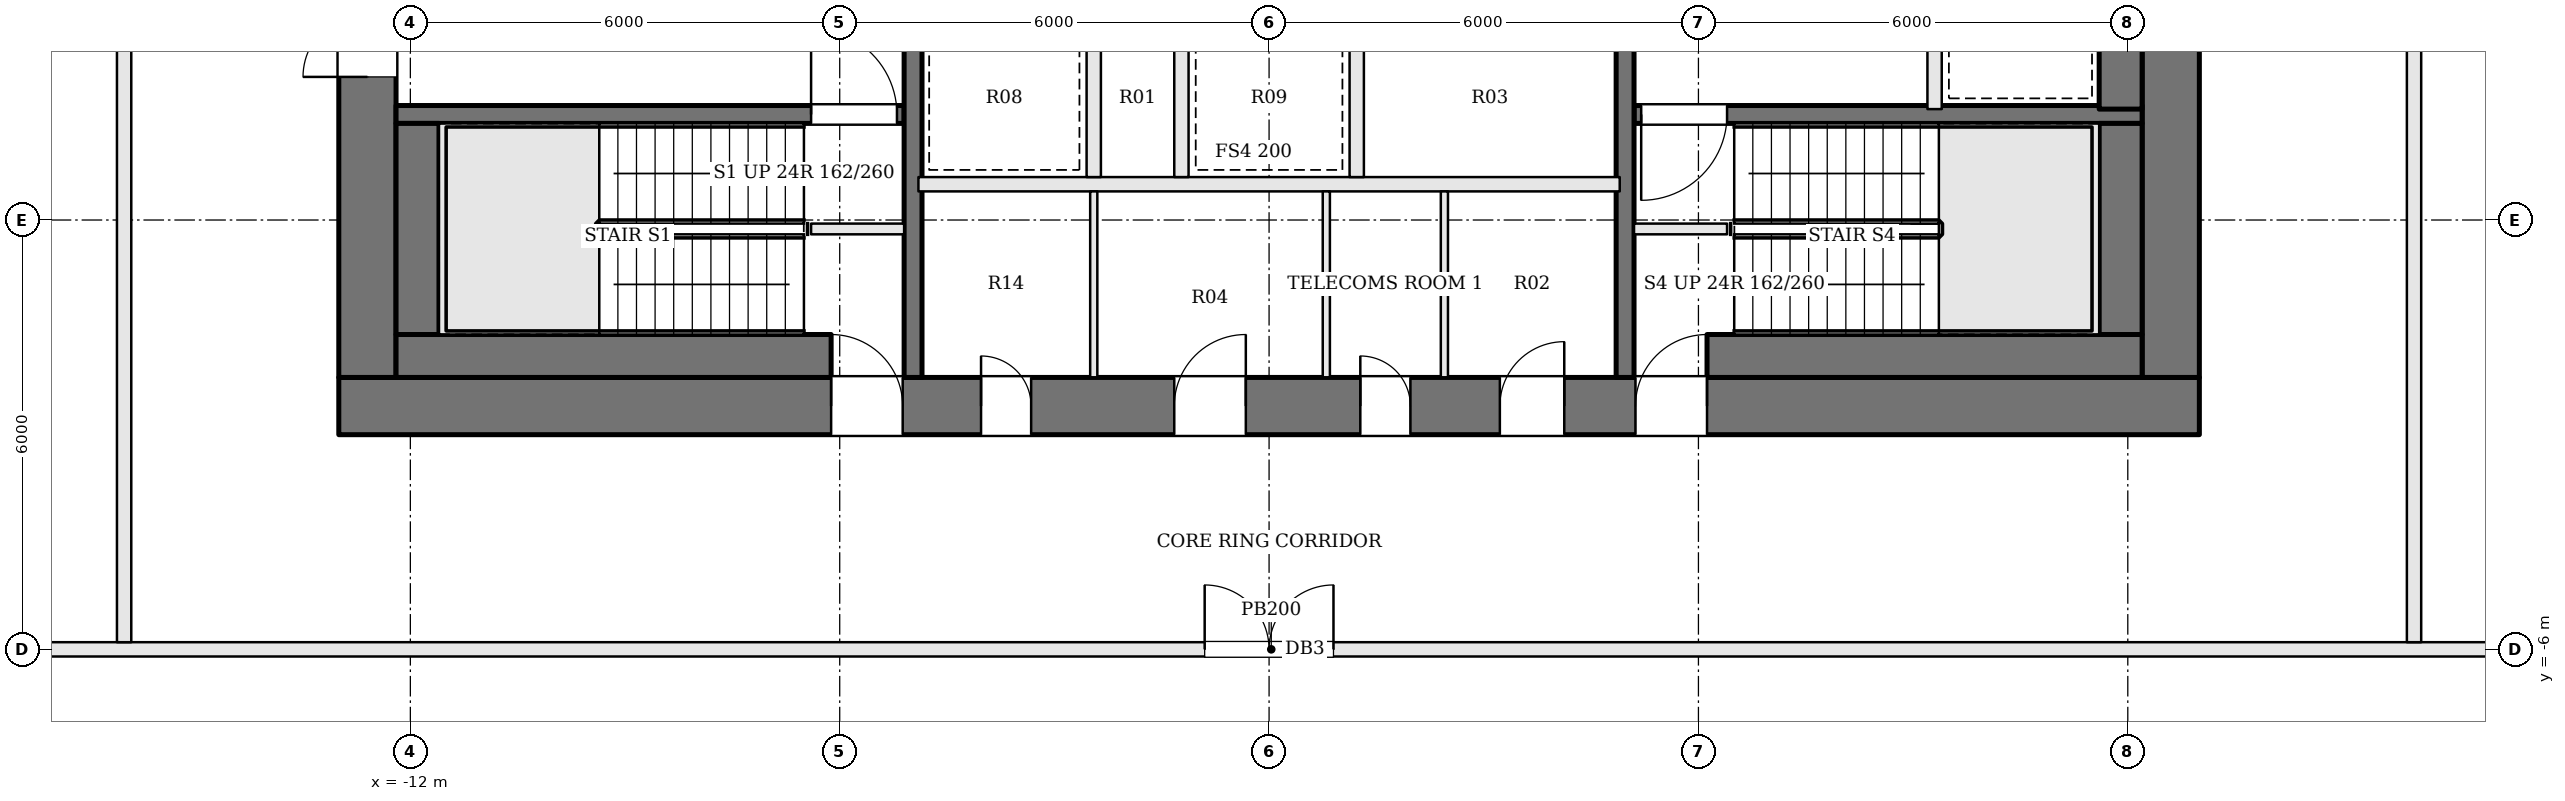
"""IFC4 building model, lengths in metres.
Left out: names, types, materials, properties, quantities, classifications, styles, units other than length and angle.
Written with IfcOpenShell. Run it as: python <this file> out.ifc"""

import sys

from ifc_helpers import new_model, si_unit, direction, frame, frame_2d, origin, place, context, subcontext, project, spatial, rectangle, extrude, element, fill, save


model = new_model("IFC4")
c1 = context("Model", 3, precision=1e-05, world=origin(), true_north=direction((0.0, 1.0)))
c2 = subcontext(c1, "Body", "Model", "MODEL_VIEW")
j1 = project(units=[si_unit("LENGTHUNIT", "METRE"), si_unit("PLANEANGLEUNIT", "RADIAN")], contexts=[c1])
p1 = place(None, origin())
s1 = spatial("IfcSite", under=j1, at=p1, CompositionType="ELEMENT")
p2 = place(p1, origin())
s2 = spatial("IfcBuilding", under=s1, at=p2, CompositionType="ELEMENT")
p3 = place(p2, frame((0.0, 0.0, 280.5)))
s3 = spatial("IfcBuildingStorey", under=s2, at=p3, CompositionType="ELEMENT", Elevation=280.5)
p4 = place(p3, frame((-13.0, -2.6, 0.0), z_axis=(0.0, 0.0, 1.0), x_axis=(1.0, 0.0, 0.0)))
e1 = element("IfcWall", 1, at=p4, inside=s3, PredefinedType="SHEAR", context=c2, shape_type="SweptSolid", body=[
    extrude(rectangle(XDim=26.0, YDim=0.8, at=frame_2d((13.0, 0.0))), origin(), (0.0, 0.0, 1.0), 3.9),
])
p5 = place(p4, frame((8.975, 0.0, 0.0)))
e2 = element("IfcOpeningElement", 2, at=p5, cuts=e1, PredefinedType="OPENING", context=c2, shape_type="SweptSolid", body=[
    extrude(rectangle(XDim=0.7, YDim=2.1, at=frame_2d((0.35, 1.05))), frame((0.0, 0.41, 0.0), z_axis=(0.0, -1.0, 0.0), x_axis=(1.0, 0.0, 0.0)), (0.0, 0.0, 1.0), 0.82),
])
p6 = place(p4, frame((11.675, 0.0, 0.0)))
e3 = element("IfcOpeningElement", 3, at=p6, cuts=e1, PredefinedType="OPENING", context=c2, shape_type="SweptSolid", body=[
    extrude(rectangle(XDim=1.0, YDim=2.1, at=frame_2d((0.5, 1.05))), frame((0.0, 0.41, 0.0), z_axis=(0.0, -1.0, 0.0), x_axis=(1.0, 0.0, 0.0)), (0.0, 0.0, 1.0), 0.82),
])
p7 = place(p4, frame((14.275, 0.0, 0.0)))
e4 = element("IfcOpeningElement", 4, at=p7, cuts=e1, PredefinedType="OPENING", context=c2, shape_type="SweptSolid", body=[
    extrude(rectangle(XDim=0.7, YDim=2.1, at=frame_2d((0.35, 1.05))), frame((0.0, 0.41, 0.0), z_axis=(0.0, -1.0, 0.0), x_axis=(1.0, 0.0, 0.0)), (0.0, 0.0, 1.0), 0.82),
])
p8 = place(p4, frame((16.225, 0.0, 0.0)))
e5 = element("IfcOpeningElement", 5, at=p8, cuts=e1, PredefinedType="OPENING", context=c2, shape_type="SweptSolid", body=[
    extrude(rectangle(XDim=0.9, YDim=2.1, at=frame_2d((0.45, 1.05))), frame((0.0, 0.41, 0.0), z_axis=(0.0, -1.0, 0.0), x_axis=(1.0, 0.0, 0.0)), (0.0, 0.0, 1.0), 0.82),
])
p9 = place(p4, frame((6.88, 0.0, 0.0)))
e6 = element("IfcOpeningElement", 6, at=p9, cuts=e1, PredefinedType="OPENING", context=c2, shape_type="SweptSolid", body=[
    extrude(rectangle(XDim=1.0, YDim=2.1, at=frame_2d((0.5, 1.05))), frame((0.0, 0.41, 0.0), z_axis=(0.0, -1.0, 0.0), x_axis=(1.0, 0.0, 0.0)), (0.0, 0.0, 1.0), 0.82),
])
p10 = place(p4, frame((18.12, 0.0, 0.0)))
e7 = element("IfcOpeningElement", 7, at=p10, cuts=e1, PredefinedType="OPENING", context=c2, shape_type="SweptSolid", body=[
    extrude(rectangle(XDim=1.0, YDim=2.1, at=frame_2d((0.5, 1.05))), frame((0.0, 0.41, 0.0), z_axis=(0.0, -1.0, 0.0), x_axis=(1.0, 0.0, 0.0)), (0.0, 0.0, 1.0), 0.82),
])
p11 = place(p3, frame((12.6, -2.2, 0.0), z_axis=(0.0, 0.0, 1.0), x_axis=(0.0, 1.0, 0.0)))
e8 = element("IfcWall", 8, at=p11, inside=s3, PredefinedType="SHEAR", context=c2, shape_type="SweptSolid", body=[
    extrude(rectangle(XDim=13.4, YDim=0.8, at=frame_2d((6.7, 0.0))), origin(), (0.0, 0.0, 1.0), 3.9),
])
p12 = place(p11, frame((7.4, 0.0, 0.0)))
e9 = element("IfcOpeningElement", 9, at=p12, cuts=e8, PredefinedType="OPENING", context=c2, shape_type="SweptSolid", body=[
    extrude(rectangle(XDim=1.8, YDim=2.1, at=frame_2d((0.9, 1.05))), frame((0.0, 0.41, 0.0), z_axis=(0.0, -1.0, 0.0), x_axis=(1.0, 0.0, 0.0)), (0.0, 0.0, 1.0), 0.82),
])
p13 = place(p3, frame((-12.6, -2.2, 0.0), z_axis=(0.0, 0.0, 1.0), x_axis=(0.0, 1.0, 0.0)))
e10 = element("IfcWall", 10, at=p13, inside=s3, PredefinedType="SHEAR", context=c2, shape_type="SweptSolid", body=[
    extrude(rectangle(XDim=13.4, YDim=0.8, at=frame_2d((6.7, 0.0))), origin(), (0.0, 0.0, 1.0), 3.9),
])
p14 = place(p13, frame((4.2, 0.0, 0.0)))
e11 = element("IfcOpeningElement", 11, at=p14, cuts=e10, PredefinedType="OPENING", context=c2, shape_type="SweptSolid", body=[
    extrude(rectangle(XDim=1.8, YDim=2.1, at=frame_2d((0.9, 1.05))), frame((0.0, 0.41, 0.0), z_axis=(0.0, -1.0, 0.0), x_axis=(1.0, 0.0, 0.0)), (0.0, 0.0, 1.0), 0.82),
])
for number, where, z_axis, x_axis in (
    (12, (-6.4, -0.125, 0.0), (0.0, 0.0, 1.0), (1.0, 0.0, 0.0)),
    (13, (6.4, -0.125, 0.0), (0.0, 0.0, 1.0), (-1.0, 0.0, 0.0)),
):
    element("IfcWall", number, at=place(p3, frame(where, z_axis=z_axis, x_axis=x_axis)), inside=s3, PredefinedType="SOLIDWALL", context=c2, shape_type="SweptSolid", body=[
        extrude(rectangle(XDim=1.3, YDim=0.15, at=frame_2d((0.65, 0.0))), origin(), (0.0, 0.0, 1.0), 3.7),
    ])
p15 = place(p3, frame((-12.2, 1.475, 0.0), z_axis=(0.0, 0.0, 1.0), x_axis=(1.0, 0.0, 0.0)))
e14 = element("IfcWall", 14, at=p15, inside=s3, PredefinedType="SOLIDWALL", context=c2, shape_type="SweptSolid", body=[
    extrude(rectangle(XDim=7.1, YDim=0.25, at=frame_2d((3.55, 0.0))), origin(), (0.0, 0.0, 1.0), 3.7),
])
p16 = place(p15, frame((5.8, 0.0, 0.0)))
e15 = element("IfcOpeningElement", 15, at=p16, cuts=e14, PredefinedType="OPENING", context=c2, shape_type="SweptSolid", body=[
    extrude(rectangle(XDim=1.2, YDim=2.1, at=frame_2d((0.6, 1.05))), frame((0.0, 0.135, 0.0), z_axis=(0.0, -1.0, 0.0), x_axis=(1.0, 0.0, 0.0)), (0.0, 0.0, 1.0), 0.27),
])
p17 = place(p3, frame((12.2, 1.475, 0.0), z_axis=(0.0, 0.0, 1.0), x_axis=(-1.0, 0.0, 0.0)))
e16 = element("IfcWall", 16, at=p17, inside=s3, PredefinedType="SOLIDWALL", context=c2, shape_type="SweptSolid", body=[
    extrude(rectangle(XDim=7.1, YDim=0.25, at=frame_2d((3.55, 0.0))), origin(), (0.0, 0.0, 1.0), 3.7),
])
p18 = place(p17, frame((5.8, 0.0, 0.0)))
e17 = element("IfcOpeningElement", 17, at=p18, cuts=e16, PredefinedType="OPENING", context=c2, shape_type="SweptSolid", body=[
    extrude(rectangle(XDim=1.2, YDim=2.1, at=frame_2d((0.6, 1.05))), frame((0.0, 0.135, 0.0), z_axis=(0.0, -1.0, 0.0), x_axis=(1.0, 0.0, 0.0)), (0.0, 0.0, 1.0), 0.27),
])
p19 = place(p3, frame((9.3, 4.55, 0.0), z_axis=(0.0, 0.0, 1.0), x_axis=(0.0, -1.0, 0.0)))
e18 = element("IfcWall", 18, at=p19, inside=s3, PredefinedType="SOLIDWALL", context=c2, shape_type="SweptSolid", body=[
    extrude(rectangle(XDim=3.0, YDim=0.2, at=frame_2d((1.5, 0.0))), origin(), (0.0, 0.0, 1.0), 3.7),
])
p20 = place(p3, frame((-4.975, -2.2, 0.0), z_axis=(0.0, 0.0, 1.0), x_axis=(0.0, 1.0, 0.0)))
e19 = element("IfcWall", 19, at=p20, inside=s3, PredefinedType="SOLIDWALL", context=c2, shape_type="SweptSolid", body=[
    extrude(rectangle(XDim=13.4, YDim=0.25, at=frame_2d((6.7, 0.0))), origin(), (0.0, 0.0, 1.0), 3.7),
])
p21 = place(p20, frame((5.25, 0.0, 0.0)))
e20 = element("IfcOpeningElement", 20, at=p21, cuts=e19, PredefinedType="OPENING", context=c2, shape_type="SweptSolid", body=[
    extrude(rectangle(XDim=1.2, YDim=2.1, at=frame_2d((0.6, 1.05))), frame((0.0, 0.135, 0.0), z_axis=(0.0, -1.0, 0.0), x_axis=(1.0, 0.0, 0.0)), (0.0, 0.0, 1.0), 0.27),
])
p22 = place(p3, frame((4.975, 11.2, 0.0), z_axis=(0.0, 0.0, 1.0), x_axis=(0.0, -1.0, 0.0)))
e21 = element("IfcWall", 21, at=p22, inside=s3, PredefinedType="SOLIDWALL", context=c2, shape_type="SweptSolid", body=[
    extrude(rectangle(XDim=13.4, YDim=0.25, at=frame_2d((6.7, 0.0))), origin(), (0.0, 0.0, 1.0), 3.7),
])
p23 = place(p22, frame((5.25, 0.0, 0.0)))
e22 = element("IfcOpeningElement", 22, at=p23, cuts=e21, PredefinedType="OPENING", context=c2, shape_type="SweptSolid", body=[
    extrude(rectangle(XDim=1.2, YDim=2.1, at=frame_2d((0.6, 1.05))), frame((0.0, 0.135, 0.0), z_axis=(0.0, -1.0, 0.0), x_axis=(1.0, 0.0, 0.0)), (0.0, 0.0, 1.0), 0.27),
])
p24 = place(p3, frame((-12.2, -1.9, 0.0), z_axis=(0.0, 0.0, 1.0), x_axis=(1.0, 0.0, 0.0)))
e23 = element("IfcWall", 23, at=p24, inside=s3, PredefinedType="SOLIDWALL", context=c2, shape_type="SweptSolid", body=[
    extrude(rectangle(XDim=6.08, YDim=0.6, at=frame_2d((3.04, 0.0))), origin(), (0.0, 0.0, 1.0), 3.7),
])
p25 = place(p3, frame((-11.9, -1.6, 0.0), z_axis=(0.0, 0.0, 1.0), x_axis=(0.0, 1.0, 0.0)))
e24 = element("IfcWall", 24, at=p25, inside=s3, PredefinedType="SOLIDWALL", context=c2, shape_type="SweptSolid", body=[
    extrude(rectangle(XDim=2.95, YDim=0.6, at=frame_2d((1.475, 0.0))), origin(), (0.0, 0.0, 1.0), 3.7),
])
p26 = place(p3, frame((11.9, 4.55, 0.0), z_axis=(0.0, 0.0, 1.0), x_axis=(0.0, -1.0, 0.0)))
e25 = element("IfcWall", 25, at=p26, inside=s3, PredefinedType="SOLIDWALL", context=c2, shape_type="SweptSolid", body=[
    extrude(rectangle(XDim=3.0, YDim=0.6, at=frame_2d((1.5, 0.0))), origin(), (0.0, 0.0, 1.0), 3.7),
])
p27 = place(p3, frame((11.9, 1.35, 0.0), z_axis=(0.0, 0.0, 1.0), x_axis=(0.0, -1.0, 0.0)))
e26 = element("IfcWall", 26, at=p27, inside=s3, PredefinedType="SOLIDWALL", context=c2, shape_type="SweptSolid", body=[
    extrude(rectangle(XDim=2.95, YDim=0.6, at=frame_2d((1.475, 0.0))), origin(), (0.0, 0.0, 1.0), 3.7),
])
p28 = place(p3, frame((12.2, -1.9, 0.0), z_axis=(0.0, 0.0, 1.0), x_axis=(-1.0, 0.0, 0.0)))
e27 = element("IfcWall", 27, at=p28, inside=s3, PredefinedType="SOLIDWALL", context=c2, shape_type="SweptSolid", body=[
    extrude(rectangle(XDim=6.08, YDim=0.6, at=frame_2d((3.04, 0.0))), origin(), (0.0, 0.0, 1.0), 3.7),
])
p29 = place(p3, frame((-4.9, 0.5, 0.0), z_axis=(0.0, 0.0, 1.0), x_axis=(1.0, 0.0, 0.0)))
e28 = element("IfcWall", 28, at=p29, inside=s3, PredefinedType="SOLIDWALL", context=c2, shape_type="SweptSolid", body=[
    extrude(rectangle(XDim=9.8, YDim=0.2, at=frame_2d((4.9, 0.0))), origin(), (0.0, 0.0, 1.0), 3.7),
])
for number, where, z_axis, x_axis in (
    (29, (-2.45, 0.6, 0.0), (0.0, 0.0, 1.0), (0.0, 1.0, 0.0)),
    (30, (-1.225, 0.6, 0.0), (0.0, 0.0, 1.0), (0.0, 1.0, 0.0)),
    (31, (1.225, 0.6, 0.0), (0.0, 0.0, 1.0), (0.0, 1.0, 0.0)),
):
    element("IfcWall", number, at=place(p3, frame(where, z_axis=z_axis, x_axis=x_axis)), inside=s3, PredefinedType="SOLIDWALL", context=c2, shape_type="SweptSolid", body=[
        extrude(rectangle(XDim=2.2, YDim=0.2, at=frame_2d((1.1, 0.0))), origin(), (0.0, 0.0, 1.0), 3.7),
    ])
for number, where, z_axis, x_axis in (
    (32, (-2.45, -2.2, 0.0), (0.0, 0.0, 1.0), (0.0, 1.0, 0.0)),
    (33, (0.8, -2.2, 0.0), (0.0, 0.0, 1.0), (0.0, 1.0, 0.0)),
    (34, (2.45, -2.2, 0.0), (0.0, 0.0, 1.0), (0.0, 1.0, 0.0)),
):
    element("IfcWall", number, at=place(p3, frame(where, z_axis=z_axis, x_axis=x_axis)), inside=s3, PredefinedType="PARTITIONING", context=c2, shape_type="SweptSolid", body=[
        extrude(rectangle(XDim=2.6, YDim=0.1, at=frame_2d((1.3, 0.0))), origin(), (0.0, 0.0, 1.0), 3.7),
    ])
p30 = place(p3, frame((19.849, -6.895, 0.0), z_axis=(0.0, 0.0, 1.0), x_axis=(-0.618811760178, -0.785539308669, 0.0)))
e35 = element("IfcWall", 35, at=p30, inside=s3, PredefinedType="PARTITIONING", context=c2, shape_type="SweptSolid", body=[
    extrude(rectangle(XDim=4.756, YDim=0.2, at=frame_2d((2.378, 0.0))), origin(), (0.0, 0.0, 1.0), 3.7),
])
p31 = place(p3, frame((-19.977, -6.0, 0.0), z_axis=(0.0, 0.0, 1.0), x_axis=(1.0, 0.0, 0.0)))
e36 = element("IfcWall", 36, at=p31, inside=s3, PredefinedType="PARTITIONING", context=c2, shape_type="SweptSolid", body=[
    extrude(rectangle(XDim=40.015, YDim=0.2, at=frame_2d((20.008, 0.0))), origin(), (0.0, 0.0, 1.0), 3.7),
])
p32 = place(p31, frame((19.077, 0.0, 0.0)))
e37 = element("IfcOpeningElement", 37, at=p32, cuts=e36, PredefinedType="OPENING", context=c2, shape_type="SweptSolid", body=[
    extrude(rectangle(XDim=1.8, YDim=2.1, at=frame_2d((0.9, 1.05))), frame((0.0, 0.11, 0.0), z_axis=(0.0, -1.0, 0.0), x_axis=(1.0, 0.0, 0.0)), (0.0, 0.0, 1.0), 0.22),
])
p33 = place(p3, frame((-16.0, 11.053, 0.0), z_axis=(0.0, 0.0, 1.0), x_axis=(0.0, -1.0, 0.0)))
e38 = element("IfcWall", 38, at=p33, inside=s3, PredefinedType="PARTITIONING", context=c2, shape_type="SweptSolid", body=[
    extrude(rectangle(XDim=16.953, YDim=0.2, at=frame_2d((8.477, 0.0))), origin(), (0.0, 0.0, 1.0), 3.7),
])
p34 = place(p33, frame((6.077, 0.0, 0.0)))
e39 = element("IfcOpeningElement", 39, at=p34, cuts=e38, PredefinedType="OPENING", context=c2, shape_type="SweptSolid", body=[
    extrude(rectangle(XDim=1.8, YDim=2.1, at=frame_2d((0.9, 1.05))), frame((0.0, 0.11, 0.0), z_axis=(0.0, -1.0, 0.0), x_axis=(1.0, 0.0, 0.0)), (0.0, 0.0, 1.0), 0.22),
])
p35 = place(p3, frame((16.0, -5.9, 0.0), z_axis=(0.0, 0.0, 1.0), x_axis=(0.0, 1.0, 0.0)))
e40 = element("IfcWall", 40, at=p35, inside=s3, PredefinedType="PARTITIONING", context=c2, shape_type="SweptSolid", body=[
    extrude(rectangle(XDim=17.017, YDim=0.2, at=frame_2d((8.508, 0.0))), origin(), (0.0, 0.0, 1.0), 3.7),
])
p36 = place(p35, frame((9.108, 0.0, 0.0)))
e41 = element("IfcOpeningElement", 41, at=p36, cuts=e40, PredefinedType="OPENING", context=c2, shape_type="SweptSolid", body=[
    extrude(rectangle(XDim=1.8, YDim=2.1, at=frame_2d((0.9, 1.05))), frame((0.0, 0.11, 0.0), z_axis=(0.0, -1.0, 0.0), x_axis=(1.0, 0.0, 0.0)), (0.0, 0.0, 1.0), 0.22),
])
p37 = place(p14, origin())
e42 = element("IfcDoor", 42, at=p37, inside=s3, OperationType="DOUBLE_DOOR_SINGLE_SWING", PredefinedType="DOOR", context=c2, shape_type="SweptSolid", body=[
    extrude(rectangle(XDim=1.8, YDim=2.1, at=frame_2d((0.9, 1.05))), frame((0.0, 0.025, 0.0), z_axis=(0.0, -1.0, 0.0), x_axis=(1.0, 0.0, 0.0)), (0.0, 0.0, 1.0), 0.05),
])
fill(e11, e42)
p38 = place(p16, origin())
e43 = element("IfcDoor", 43, at=p38, inside=s3, OperationType="SINGLE_SWING_LEFT", PredefinedType="DOOR", context=c2, shape_type="SweptSolid", body=[
    extrude(rectangle(XDim=1.2, YDim=2.1, at=frame_2d((0.6, 1.05))), frame((0.0, 0.025, 0.0), z_axis=(0.0, -1.0, 0.0), x_axis=(1.0, 0.0, 0.0)), (0.0, 0.0, 1.0), 0.05),
])
fill(e15, e43)
p39 = place(p18, origin())
e44 = element("IfcDoor", 44, at=p39, inside=s3, OperationType="SINGLE_SWING_RIGHT", PredefinedType="DOOR", context=c2, shape_type="SweptSolid", body=[
    extrude(rectangle(XDim=1.2, YDim=2.1, at=frame_2d((0.6, 1.05))), frame((0.0, 0.025, 0.0), z_axis=(0.0, -1.0, 0.0), x_axis=(1.0, 0.0, 0.0)), (0.0, 0.0, 1.0), 0.05),
])
fill(e17, e44)
p40 = place(p5, origin())
e45 = element("IfcDoor", 45, at=p40, inside=s3, OperationType="SINGLE_SWING_LEFT", PredefinedType="DOOR", context=c2, shape_type="SweptSolid", body=[
    extrude(rectangle(XDim=0.7, YDim=2.1, at=frame_2d((0.35, 1.05))), frame((0.0, 0.025, 0.0), z_axis=(0.0, -1.0, 0.0), x_axis=(1.0, 0.0, 0.0)), (0.0, 0.0, 1.0), 0.05),
])
fill(e2, e45)
p41 = place(p6, origin())
e46 = element("IfcDoor", 46, at=p41, inside=s3, OperationType="SINGLE_SWING_RIGHT", PredefinedType="DOOR", context=c2, shape_type="SweptSolid", body=[
    extrude(rectangle(XDim=1.0, YDim=2.1, at=frame_2d((0.5, 1.05))), frame((0.0, 0.025, 0.0), z_axis=(0.0, -1.0, 0.0), x_axis=(1.0, 0.0, 0.0)), (0.0, 0.0, 1.0), 0.05),
])
fill(e3, e46)
p42 = place(p7, origin())
e47 = element("IfcDoor", 47, at=p42, inside=s3, OperationType="SINGLE_SWING_LEFT", PredefinedType="DOOR", context=c2, shape_type="SweptSolid", body=[
    extrude(rectangle(XDim=0.7, YDim=2.1, at=frame_2d((0.35, 1.05))), frame((0.0, 0.025, 0.0), z_axis=(0.0, -1.0, 0.0), x_axis=(1.0, 0.0, 0.0)), (0.0, 0.0, 1.0), 0.05),
])
fill(e4, e47)
p43 = place(p8, origin())
e48 = element("IfcDoor", 48, at=p43, inside=s3, OperationType="SINGLE_SWING_RIGHT", PredefinedType="DOOR", context=c2, shape_type="SweptSolid", body=[
    extrude(rectangle(XDim=0.9, YDim=2.1, at=frame_2d((0.45, 1.05))), frame((0.0, 0.025, 0.0), z_axis=(0.0, -1.0, 0.0), x_axis=(1.0, 0.0, 0.0)), (0.0, 0.0, 1.0), 0.05),
])
fill(e5, e48)
p44 = place(p9, origin())
e49 = element("IfcDoor", 49, at=p44, inside=s3, OperationType="SINGLE_SWING_LEFT", PredefinedType="DOOR", context=c2, shape_type="SweptSolid", body=[
    extrude(rectangle(XDim=1.0, YDim=2.1, at=frame_2d((0.5, 1.05))), frame((0.0, 0.025, 0.0), z_axis=(0.0, -1.0, 0.0), x_axis=(1.0, 0.0, 0.0)), (0.0, 0.0, 1.0), 0.05),
])
fill(e6, e49)
p45 = place(p10, origin())
e50 = element("IfcDoor", 50, at=p45, inside=s3, OperationType="SINGLE_SWING_RIGHT", PredefinedType="DOOR", context=c2, shape_type="SweptSolid", body=[
    extrude(rectangle(XDim=1.0, YDim=2.1, at=frame_2d((0.5, 1.05))), frame((0.0, 0.025, 0.0), z_axis=(0.0, -1.0, 0.0), x_axis=(1.0, 0.0, 0.0)), (0.0, 0.0, 1.0), 0.05),
])
fill(e7, e50)
p46 = place(p32, origin())
e51 = element("IfcDoor", 51, at=p46, inside=s3, OperationType="DOUBLE_DOOR_SINGLE_SWING", PredefinedType="DOOR", context=c2, shape_type="SweptSolid", body=[
    extrude(rectangle(XDim=1.8, YDim=2.1, at=frame_2d((0.9, 1.05))), frame((0.0, 0.025, 0.0), z_axis=(0.0, -1.0, 0.0), x_axis=(1.0, 0.0, 0.0)), (0.0, 0.0, 1.0), 0.05),
])
fill(e37, e51)
save(model, sys.argv[1])
